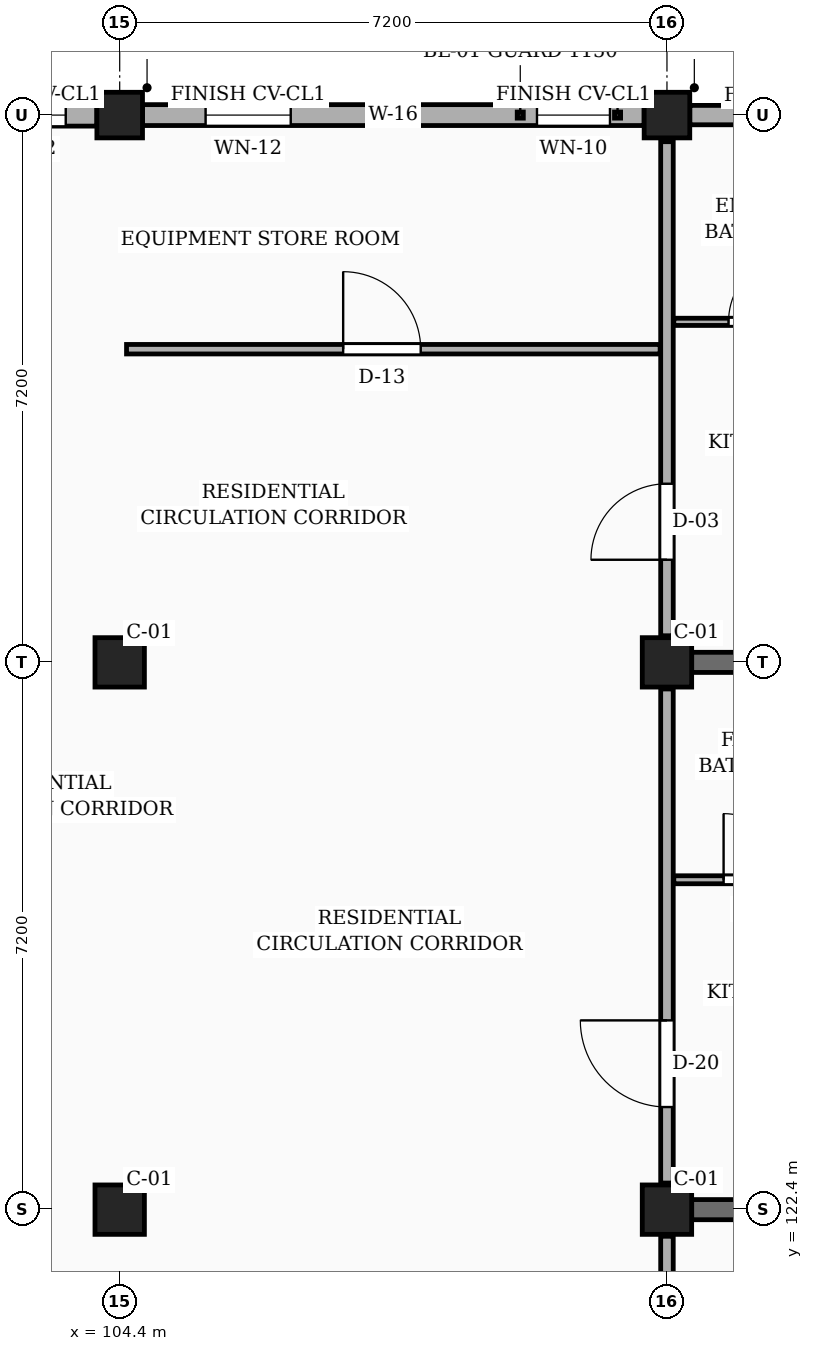
"""IFC4 building model, lengths in metres.
Left out: names, types, materials, properties, quantities, classifications, styles, units other than length and angle.
Written with IfcOpenShell. Run it as: python <this file> out.ifc"""

import sys

from ifc_helpers import new_model, si_unit, direction, frame, frame_2d, origin, origin_2d, place, context, subcontext, project, spatial, rectangle, extrude, element, fill, save


model = new_model("IFC4")
c1 = context("Model", 3, precision=1e-05, world=origin(), true_north=direction((0.0, 1.0)))
c2 = subcontext(c1, "Body", "Model", "MODEL_VIEW")
j1 = project(units=[si_unit("LENGTHUNIT", "METRE"), si_unit("PLANEANGLEUNIT", "RADIAN")], contexts=[c1])
p1 = place(None, origin())
s1 = spatial("IfcSite", under=j1, at=p1, CompositionType="ELEMENT")
p2 = place(p1, origin())
s2 = spatial("IfcBuilding", under=s1, at=p2, CompositionType="ELEMENT")
p3 = place(p2, frame((0.0, 0.0, 7.65)))
s3 = spatial("IfcBuildingStorey", under=s2, at=p3, CompositionType="ELEMENT", Elevation=7.65)
for number, where, z_axis, x_axis in (
    (1, (104.4, 122.4, 0.0), (0.0, 0.0, 1.0), (1.0, 0.0, 0.0)),
    (2, (104.4, 129.6, 0.0), (0.0, 0.0, 1.0), (1.0, 0.0, 0.0)),
):
    element("IfcColumn", number, at=place(p3, frame(where, z_axis=z_axis, x_axis=x_axis)), inside=s3, PredefinedType="COLUMN", context=c2, shape_type="SweptSolid", body=[
        extrude(rectangle(XDim=0.65, YDim=0.65, at=origin_2d()), origin(), (0.0, 0.0, 1.0), 3.15),
    ])
p4 = place(p3, frame((104.4, 136.8, 0.0), z_axis=(0.0, 0.0, 1.0), x_axis=(1.0, 0.0, 0.0)))
e3 = element("IfcColumn", 3, at=p4, inside=s3, PredefinedType="COLUMN", context=c2, shape_type="SweptSolid", body=[
    extrude(rectangle(XDim=0.6, YDim=0.6, at=origin_2d()), origin(), (0.0, 0.0, 1.0), 3.15),
])
for number, where, z_axis, x_axis in (
    (4, (111.6, 122.4, 0.0), (0.0, 0.0, 1.0), (1.0, 0.0, 0.0)),
    (5, (111.6, 129.6, 0.0), (0.0, 0.0, 1.0), (1.0, 0.0, 0.0)),
):
    element("IfcColumn", number, at=place(p3, frame(where, z_axis=z_axis, x_axis=x_axis)), inside=s3, PredefinedType="COLUMN", context=c2, shape_type="SweptSolid", body=[
        extrude(rectangle(XDim=0.65, YDim=0.65, at=origin_2d()), origin(), (0.0, 0.0, 1.0), 3.15),
    ])
p5 = place(p3, frame((111.6, 136.8, 0.0), z_axis=(0.0, 0.0, 1.0), x_axis=(1.0, 0.0, 0.0)))
e6 = element("IfcColumn", 6, at=p5, inside=s3, PredefinedType="COLUMN", context=c2, shape_type="SweptSolid", body=[
    extrude(rectangle(XDim=0.6, YDim=0.6, at=origin_2d()), origin(), (0.0, 0.0, 1.0), 3.15),
])
for number, where, z_axis, x_axis in (
    (7, (111.925, 122.4, 0.0), (0.0, 0.0, 1.0), (1.0, 0.0, 0.0)),
    (8, (111.925, 129.6, 0.0), (0.0, 0.0, 1.0), (1.0, 0.0, 0.0)),
):
    element("IfcWall", number, at=place(p3, frame(where, z_axis=z_axis, x_axis=x_axis)), inside=s3, PredefinedType="SOLIDWALL", context=c2, shape_type="SweptSolid", body=[
        extrude(rectangle(XDim=6.575, YDim=0.265, at=frame_2d((3.288, 0.0))), origin(), (0.0, 0.0, 1.0), 2.19),
    ])
p6 = place(p3, frame((118.5, 136.8, 0.0), z_axis=(0.0, 0.0, 1.0), x_axis=(-1.0, 0.0, 0.0)))
e9 = element("IfcWall", 9, at=p6, inside=s3, PredefinedType="SOLIDWALL", context=c2, shape_type="SweptSolid", body=[
    extrude(rectangle(XDim=6.6, YDim=0.255, at=frame_2d((3.3, 0.0))), origin(), (0.0, 0.0, 1.0), 2.46),
])
p7 = place(p6, frame((0.45, 0.0, 0.78)))
e10 = element("IfcOpeningElement", 10, at=p7, cuts=e9, PredefinedType="OPENING", context=c2, shape_type="SweptSolid", body=[
    extrude(rectangle(XDim=1.4, YDim=1.15, at=frame_2d((0.7, 0.575))), frame((0.0, 0.137, 0.0), z_axis=(0.0, -1.0, 0.0), x_axis=(1.0, 0.0, 0.0)), (0.0, 0.0, 1.0), 0.275),
])
p8 = place(p6, frame((4.65, 0.0, 0.78)))
e11 = element("IfcOpeningElement", 11, at=p8, cuts=e9, PredefinedType="OPENING", context=c2, shape_type="SweptSolid", body=[
    extrude(rectangle(XDim=0.96, YDim=1.26, at=frame_2d((0.48, 0.63))), frame((0.0, 0.137, 0.0), z_axis=(0.0, -1.0, 0.0), x_axis=(1.0, 0.0, 0.0)), (0.0, 0.0, 1.0), 0.275),
])
p9 = place(p3, frame((111.3, 136.8, 0.0), z_axis=(0.0, 0.0, 1.0), x_axis=(-1.0, 0.0, 0.0)))
e12 = element("IfcWall", 12, at=p9, inside=s3, PredefinedType="SOLIDWALL", context=c2, shape_type="SweptSolid", body=[
    extrude(rectangle(XDim=6.6, YDim=0.275, at=frame_2d((3.3, 0.0))), origin(), (0.0, 0.0, 1.0), 2.46),
])
p10 = place(p9, frame((0.45, 0.0, 0.78)))
e13 = element("IfcOpeningElement", 13, at=p10, cuts=e12, PredefinedType="OPENING", context=c2, shape_type="SweptSolid", body=[
    extrude(rectangle(XDim=0.96, YDim=1.26, at=frame_2d((0.48, 0.63))), frame((0.0, 0.147, 0.0), z_axis=(0.0, -1.0, 0.0), x_axis=(1.0, 0.0, 0.0)), (0.0, 0.0, 1.0), 0.295),
])
p11 = place(p9, frame((4.65, 0.0, 0.78)))
e14 = element("IfcOpeningElement", 14, at=p11, cuts=e12, PredefinedType="OPENING", context=c2, shape_type="SweptSolid", body=[
    extrude(rectangle(XDim=1.12, YDim=1.26, at=frame_2d((0.56, 0.63))), frame((0.0, 0.147, 0.0), z_axis=(0.0, -1.0, 0.0), x_axis=(1.0, 0.0, 0.0)), (0.0, 0.0, 1.0), 0.295),
])
p12 = place(p3, frame((104.1, 136.8, 0.0), z_axis=(0.0, 0.0, 1.0), x_axis=(-1.0, 0.0, 0.0)))
e15 = element("IfcWall", 15, at=p12, inside=s3, PredefinedType="SOLIDWALL", context=c2, shape_type="SweptSolid", body=[
    extrude(rectangle(XDim=6.6, YDim=0.29, at=frame_2d((3.3, 0.0))), origin(), (0.0, 0.0, 1.0), 2.46),
])
p13 = place(p12, frame((0.41, 0.0, 0.78)))
e16 = element("IfcOpeningElement", 16, at=p13, cuts=e15, PredefinedType="OPENING", context=c2, shape_type="SweptSolid", body=[
    extrude(rectangle(XDim=1.12, YDim=1.26, at=frame_2d((0.56, 0.63))), frame((0.0, 0.155, 0.0), z_axis=(0.0, -1.0, 0.0), x_axis=(1.0, 0.0, 0.0)), (0.0, 0.0, 1.0), 0.31),
])
p14 = place(p12, frame((2.75, 0.0, 0.78)))
e17 = element("IfcOpeningElement", 17, at=p14, cuts=e15, PredefinedType="OPENING", context=c2, shape_type="SweptSolid", body=[
    extrude(rectangle(XDim=1.28, YDim=1.26, at=frame_2d((0.64, 0.63))), frame((0.0, 0.155, 0.0), z_axis=(0.0, -1.0, 0.0), x_axis=(1.0, 0.0, 0.0)), (0.0, 0.0, 1.0), 0.31),
])
p15 = place(p12, frame((5.28, 0.0, 0.78)))
e18 = element("IfcOpeningElement", 18, at=p15, cuts=e15, PredefinedType="OPENING", context=c2, shape_type="SweptSolid", body=[
    extrude(rectangle(XDim=0.88, YDim=1.26, at=frame_2d((0.44, 0.63))), frame((0.0, 0.155, 0.0), z_axis=(0.0, -1.0, 0.0), x_axis=(1.0, 0.0, 0.0)), (0.0, 0.0, 1.0), 0.31),
])
p16 = place(p3, frame((111.6, 115.55, 0.0), z_axis=(0.0, 0.0, 1.0), x_axis=(0.0, 1.0, 0.0)))
e19 = element("IfcWall", 19, at=p16, inside=s3, PredefinedType="PARTITIONING", context=c2, shape_type="SweptSolid", body=[
    extrude(rectangle(XDim=6.5, YDim=0.165, at=frame_2d((3.25, 0.0))), origin(), (0.0, 0.0, 1.0), 2.24),
])
p17 = place(p16, frame((1.1, 0.0, 0.0)))
e20 = element("IfcOpeningElement", 20, at=p17, cuts=e19, PredefinedType="OPENING", context=c2, shape_type="SweptSolid", body=[
    extrude(rectangle(XDim=0.94, YDim=2.12, at=frame_2d((0.47, 1.06))), frame((0.0, 0.093, 0.0), z_axis=(0.0, -1.0, 0.0), x_axis=(1.0, 0.0, 0.0)), (0.0, 0.0, 1.0), 0.185),
])
p18 = place(p3, frame((111.6, 122.75, 0.0), z_axis=(0.0, 0.0, 1.0), x_axis=(0.0, 1.0, 0.0)))
e21 = element("IfcWall", 21, at=p18, inside=s3, PredefinedType="PARTITIONING", context=c2, shape_type="SweptSolid", body=[
    extrude(rectangle(XDim=6.5, YDim=0.165, at=frame_2d((3.25, 0.0))), origin(), (0.0, 0.0, 1.0), 2.24),
])
p19 = place(p18, frame((1.0, 0.0, 0.0)))
e22 = element("IfcOpeningElement", 22, at=p19, cuts=e21, PredefinedType="OPENING", context=c2, shape_type="SweptSolid", body=[
    extrude(rectangle(XDim=1.14, YDim=2.18, at=frame_2d((0.57, 1.09))), frame((0.0, 0.093, 0.0), z_axis=(0.0, -1.0, 0.0), x_axis=(1.0, 0.0, 0.0)), (0.0, 0.0, 1.0), 0.185),
])
p20 = place(p3, frame((111.6, 129.95, 0.0), z_axis=(0.0, 0.0, 1.0), x_axis=(0.0, 1.0, 0.0)))
e23 = element("IfcWall", 23, at=p20, inside=s3, PredefinedType="PARTITIONING", context=c2, shape_type="SweptSolid", body=[
    extrude(rectangle(XDim=6.5, YDim=0.165, at=frame_2d((3.25, 0.0))), origin(), (0.0, 0.0, 1.0), 2.24),
])
p21 = place(p20, frame((1.0, 0.0, 0.0)))
e24 = element("IfcOpeningElement", 24, at=p21, cuts=e23, PredefinedType="OPENING", context=c2, shape_type="SweptSolid", body=[
    extrude(rectangle(XDim=1.0, YDim=2.15, at=frame_2d((0.5, 1.075))), frame((0.0, 0.093, 0.0), z_axis=(0.0, -1.0, 0.0), x_axis=(1.0, 0.0, 0.0)), (0.0, 0.0, 1.0), 0.185),
])
p22 = place(p3, frame((111.69, 126.74, 0.0), z_axis=(0.0, 0.0, 1.0), x_axis=(1.0, 0.0, 0.0)))
e25 = element("IfcWall", 25, at=p22, inside=s3, PredefinedType="PARTITIONING", context=c2, shape_type="SweptSolid", body=[
    extrude(rectangle(XDim=2.18, YDim=0.105, at=frame_2d((1.09, 0.0))), origin(), (0.0, 0.0, 1.0), 2.325),
])
p23 = place(p22, frame((0.655, 0.0, 0.0)))
e26 = element("IfcOpeningElement", 26, at=p23, cuts=e25, PredefinedType="OPENING", context=c2, shape_type="SweptSolid", body=[
    extrude(rectangle(XDim=0.87, YDim=2.05, at=frame_2d((0.435, 1.025))), frame((0.0, 0.062, 0.0), z_axis=(0.0, -1.0, 0.0), x_axis=(1.0, 0.0, 0.0)), (0.0, 0.0, 1.0), 0.125),
])
p24 = place(p3, frame((104.49, 133.72, 0.0), z_axis=(0.0, 0.0, 1.0), x_axis=(1.0, 0.0, 0.0)))
e27 = element("IfcWall", 27, at=p24, inside=s3, PredefinedType="PARTITIONING", context=c2, shape_type="SweptSolid", body=[
    extrude(rectangle(XDim=7.02, YDim=0.125, at=frame_2d((3.51, 0.0))), origin(), (0.0, 0.0, 1.0), 2.325),
])
p25 = place(p24, frame((2.85, 0.0, 0.0)))
e28 = element("IfcOpeningElement", 28, at=p25, cuts=e27, PredefinedType="OPENING", context=c2, shape_type="SweptSolid", body=[
    extrude(rectangle(XDim=1.02, YDim=2.15, at=frame_2d((0.51, 1.075))), frame((0.0, 0.073, 0.0), z_axis=(0.0, -1.0, 0.0), x_axis=(1.0, 0.0, 0.0)), (0.0, 0.0, 1.0), 0.145),
])
p26 = place(p3, frame((111.69, 134.08, 0.0), z_axis=(0.0, 0.0, 1.0), x_axis=(1.0, 0.0, 0.0)))
e29 = element("IfcWall", 29, at=p26, inside=s3, PredefinedType="PARTITIONING", context=c2, shape_type="SweptSolid", body=[
    extrude(rectangle(XDim=2.34, YDim=0.095, at=frame_2d((1.17, 0.0))), origin(), (0.0, 0.0, 1.0), 2.325),
])
p27 = place(p26, frame((0.72, 0.0, 0.0)))
e30 = element("IfcOpeningElement", 30, at=p27, cuts=e29, PredefinedType="OPENING", context=c2, shape_type="SweptSolid", body=[
    extrude(rectangle(XDim=0.9, YDim=2.05, at=frame_2d((0.45, 1.025))), frame((0.0, 0.058, 0.0), z_axis=(0.0, -1.0, 0.0), x_axis=(1.0, 0.0, 0.0)), (0.0, 0.0, 1.0), 0.115),
])
p28 = place(p10, origin())
e31 = element("IfcWindow", 31, at=p28, inside=s3, PartitioningType="SINGLE_PANEL", PredefinedType="WINDOW", context=c2, shape_type="SweptSolid", body=[
    extrude(rectangle(XDim=0.96, YDim=1.26, at=frame_2d((0.48, 0.63))), frame((0.0, 0.03, 0.0), z_axis=(0.0, -1.0, 0.0), x_axis=(1.0, 0.0, 0.0)), (0.0, 0.0, 1.0), 0.06),
])
fill(e13, e31)
p29 = place(p11, origin())
e32 = element("IfcWindow", 32, at=p29, inside=s3, PartitioningType="SINGLE_PANEL", PredefinedType="WINDOW", context=c2, shape_type="SweptSolid", body=[
    extrude(rectangle(XDim=1.12, YDim=1.26, at=frame_2d((0.56, 0.63))), frame((0.0, 0.03, 0.0), z_axis=(0.0, -1.0, 0.0), x_axis=(1.0, 0.0, 0.0)), (0.0, 0.0, 1.0), 0.06),
])
fill(e14, e32)
p30 = place(p13, origin())
e33 = element("IfcWindow", 33, at=p30, inside=s3, PartitioningType="SINGLE_PANEL", PredefinedType="WINDOW", context=c2, shape_type="SweptSolid", body=[
    extrude(rectangle(XDim=1.12, YDim=1.26, at=frame_2d((0.56, 0.63))), frame((0.0, 0.03, 0.0), z_axis=(0.0, -1.0, 0.0), x_axis=(1.0, 0.0, 0.0)), (0.0, 0.0, 1.0), 0.06),
])
fill(e16, e33)
p31 = place(p19, origin())
e34 = element("IfcDoor", 34, at=p31, inside=s3, OperationType="SINGLE_SWING_RIGHT", PredefinedType="DOOR", context=c2, shape_type="SweptSolid", body=[
    extrude(rectangle(XDim=1.14, YDim=2.18, at=frame_2d((0.57, 1.09))), frame((0.0, 0.025, 0.0), z_axis=(0.0, -1.0, 0.0), x_axis=(1.0, 0.0, 0.0)), (0.0, 0.0, 1.0), 0.05),
])
fill(e22, e34)
p32 = place(p21, origin())
e35 = element("IfcDoor", 35, at=p32, inside=s3, OperationType="SINGLE_SWING_LEFT", PredefinedType="DOOR", context=c2, shape_type="SweptSolid", body=[
    extrude(rectangle(XDim=1.0, YDim=2.15, at=frame_2d((0.5, 1.075))), frame((0.0, 0.025, 0.0), z_axis=(0.0, -1.0, 0.0), x_axis=(1.0, 0.0, 0.0)), (0.0, 0.0, 1.0), 0.05),
])
fill(e24, e35)
p33 = place(p23, origin())
e36 = element("IfcDoor", 36, at=p33, inside=s3, OperationType="SINGLE_SWING_LEFT", PredefinedType="DOOR", context=c2, shape_type="SweptSolid", body=[
    extrude(rectangle(XDim=0.87, YDim=2.05, at=frame_2d((0.435, 1.025))), frame((0.0, 0.025, 0.0), z_axis=(0.0, -1.0, 0.0), x_axis=(1.0, 0.0, 0.0)), (0.0, 0.0, 1.0), 0.05),
])
fill(e26, e36)
p34 = place(p25, origin())
e37 = element("IfcDoor", 37, at=p34, inside=s3, OperationType="SINGLE_SWING_LEFT", PredefinedType="DOOR", context=c2, shape_type="SweptSolid", body=[
    extrude(rectangle(XDim=1.02, YDim=2.15, at=frame_2d((0.51, 1.075))), frame((0.0, 0.025, 0.0), z_axis=(0.0, -1.0, 0.0), x_axis=(1.0, 0.0, 0.0)), (0.0, 0.0, 1.0), 0.05),
])
fill(e28, e37)
p35 = place(p27, origin())
e38 = element("IfcDoor", 38, at=p35, inside=s3, OperationType="SINGLE_SWING_RIGHT", PredefinedType="DOOR", context=c2, shape_type="SweptSolid", body=[
    extrude(rectangle(XDim=0.9, YDim=2.05, at=frame_2d((0.45, 1.025))), frame((0.0, 0.025, 0.0), z_axis=(0.0, -1.0, 0.0), x_axis=(1.0, 0.0, 0.0)), (0.0, 0.0, 1.0), 0.05),
])
fill(e30, e38)
save(model, sys.argv[1])
